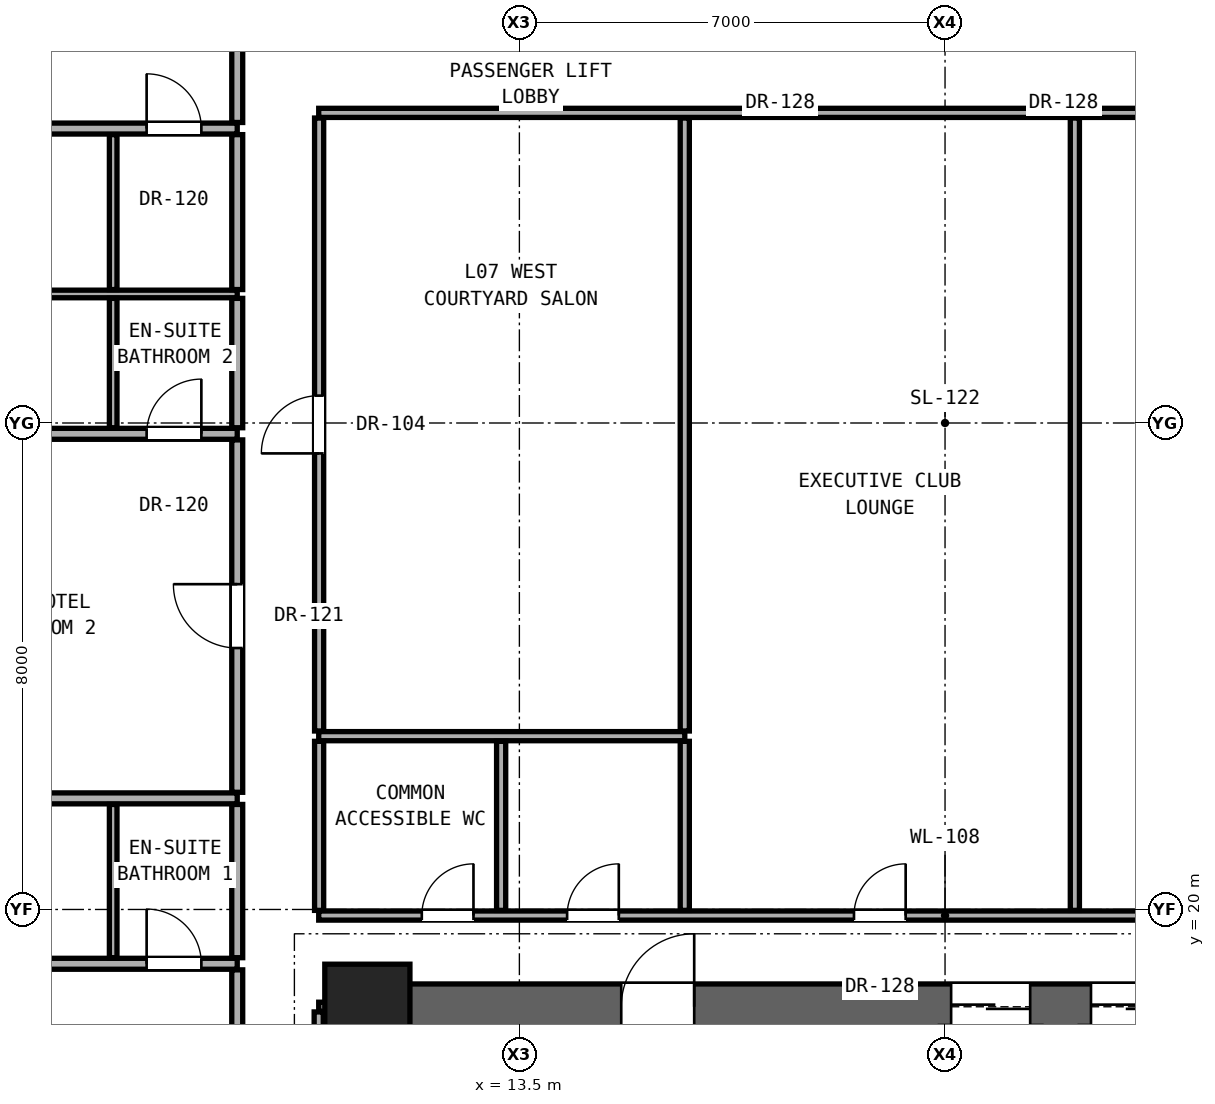
"""IFC4 building model, lengths in metres.
Left out: names, types, materials, properties, quantities, classifications, styles, units other than length and angle.
Written with IfcOpenShell. Run it as: python <this file> out.ifc"""

import sys

from ifc_helpers import new_model, si_unit, direction, frame, frame_2d, origin, origin_2d, place, context, subcontext, project, spatial, rectangle, extrude, element, fill, save


model = new_model("IFC4")
c1 = context("Model", 3, precision=1e-05, world=origin(), true_north=direction((0.0, 1.0)))
c2 = subcontext(c1, "Body", "Model", "MODEL_VIEW")
j1 = project(units=[si_unit("LENGTHUNIT", "METRE"), si_unit("PLANEANGLEUNIT", "RADIAN")], contexts=[c1])
p1 = place(None, origin())
s1 = spatial("IfcSite", under=j1, at=p1, CompositionType="ELEMENT")
p2 = place(p1, origin())
s2 = spatial("IfcBuilding", under=s1, at=p2, CompositionType="ELEMENT")
p3 = place(p2, frame((0.0, 0.0, 29.0)))
s3 = spatial("IfcBuildingStorey", under=s2, at=p3, CompositionType="ELEMENT", Elevation=29.0)
p4 = place(p3, frame((11.0, 18.4, 0.0), z_axis=(0.0, 0.0, 1.0), x_axis=(1.0, 0.0, 0.0)))
e1 = element("IfcColumn", 1, at=p4, inside=s3, PredefinedType="COLUMN", context=c2, shape_type="SweptSolid", body=[
    extrude(rectangle(XDim=1.4, YDim=1.4, at=origin_2d()), origin(), (0.0, 0.0, 1.0), 3.3),
])
p5 = place(p3, frame((11.0, 12.4, 0.0), z_axis=(0.0, 0.0, 1.0), x_axis=(0.0, 1.0, 0.0)))
e2 = element("IfcWall", 2, at=p5, inside=s3, PredefinedType="SHEAR", context=c2, shape_type="SweptSolid", body=[
    extrude(rectangle(XDim=6.0, YDim=0.75, at=frame_2d((3.0, 0.0))), origin(), (0.0, 0.0, 1.0), 3.06),
])
p6 = place(p3, frame((11.0, 18.4, 0.0), z_axis=(0.0, 0.0, 1.0), x_axis=(1.0, 0.0, 0.0)))
e3 = element("IfcWall", 3, at=p6, inside=s3, PredefinedType="SHEAR", context=c2, shape_type="SweptSolid", body=[
    extrude(rectangle(XDim=19.0, YDim=0.75, at=frame_2d((9.5, 0.0))), origin(), (0.0, 0.0, 1.0), 3.06),
])
p7 = place(p6, frame((4.175, 0.0, 0.0)))
e4 = element("IfcOpeningElement", 4, at=p7, cuts=e3, PredefinedType="OPENING", context=c2, shape_type="SweptSolid", body=[
    extrude(rectangle(XDim=1.2, YDim=2.25, at=frame_2d((0.6, 1.125))), frame((0.0, 0.385, 0.0), z_axis=(0.0, -1.0, 0.0), x_axis=(1.0, 0.0, 0.0)), (0.0, 0.0, 1.0), 0.77),
])
p8 = place(p6, frame((9.6, 0.0, 0.0)))
e5 = element("IfcOpeningElement", 5, at=p8, cuts=e3, PredefinedType="OPENING", context=c2, shape_type="SweptSolid", body=[
    extrude(rectangle(XDim=1.3, YDim=2.3, at=frame_2d((0.65, 1.15))), frame((0.0, 0.385, 0.0), z_axis=(0.0, -1.0, 0.0), x_axis=(1.0, 0.0, 0.0)), (0.0, 0.0, 1.0), 0.77),
])
p9 = place(p6, frame((11.9, 0.0, 0.0)))
e6 = element("IfcOpeningElement", 6, at=p9, cuts=e3, PredefinedType="OPENING", context=c2, shape_type="SweptSolid", body=[
    extrude(rectangle(XDim=1.3, YDim=2.3, at=frame_2d((0.65, 1.15))), frame((0.0, 0.385, 0.0), z_axis=(0.0, -1.0, 0.0), x_axis=(1.0, 0.0, 0.0)), (0.0, 0.0, 1.0), 0.77),
])
p10 = place(p6, frame((14.3, 0.0, 0.0)))
e7 = element("IfcOpeningElement", 7, at=p10, cuts=e3, PredefinedType="OPENING", context=c2, shape_type="SweptSolid", body=[
    extrude(rectangle(XDim=1.3, YDim=2.3, at=frame_2d((0.65, 1.15))), frame((0.0, 0.385, 0.0), z_axis=(0.0, -1.0, 0.0), x_axis=(1.0, 0.0, 0.0)), (0.0, 0.0, 1.0), 0.77),
])
p11 = place(p6, frame((16.6, 0.0, 0.0)))
e8 = element("IfcOpeningElement", 8, at=p11, cuts=e3, PredefinedType="OPENING", context=c2, shape_type="SweptSolid", body=[
    extrude(rectangle(XDim=1.3, YDim=2.3, at=frame_2d((0.65, 1.15))), frame((0.0, 0.385, 0.0), z_axis=(0.0, -1.0, 0.0), x_axis=(1.0, 0.0, 0.0)), (0.0, 0.0, 1.0), 0.77),
])
p12 = place(p3, frame((10.2, 18.4, 0.0), z_axis=(0.0, 0.0, 1.0), x_axis=(1.0, 0.0, 0.0)))
e9 = element("IfcWall", 9, at=p12, inside=s3, PredefinedType="PARTITIONING", context=c2, shape_type="SweptSolid", body=[
    extrude(rectangle(XDim=0.43, YDim=0.15, at=frame_2d((0.215, 0.0))), origin(), (0.0, 0.0, 1.0), 2.436),
])
p13 = place(p3, frame((-1.04, 19.107, 0.0), z_axis=(0.0, 0.0, 1.0), x_axis=(1.0, 0.0, 0.0)))
e10 = element("IfcWall", 10, at=p13, inside=s3, PredefinedType="PARTITIONING", context=c2, shape_type="SweptSolid", body=[
    extrude(rectangle(XDim=9.9, YDim=0.18, at=frame_2d((4.95, 0.0))), origin(), (0.0, 0.0, 1.0), 2.125),
])
p14 = place(p13, frame((4.125, 0.0, 0.0)))
e11 = element("IfcOpeningElement", 11, at=p14, cuts=e10, PredefinedType="OPENING", context=c2, shape_type="SweptSolid", body=[
    extrude(rectangle(XDim=0.85, YDim=2.01, at=frame_2d((0.425, 1.005))), frame((0.0, 0.1, 0.0), z_axis=(0.0, -1.0, 0.0), x_axis=(1.0, 0.0, 0.0)), (0.0, 0.0, 1.0), 0.2),
])
p15 = place(p13, frame((8.41, 0.0, 0.0)))
e12 = element("IfcOpeningElement", 12, at=p15, cuts=e10, PredefinedType="OPENING", context=c2, shape_type="SweptSolid", body=[
    extrude(rectangle(XDim=0.9, YDim=2.1, at=frame_2d((0.45, 1.05))), frame((0.0, 0.1, 0.0), z_axis=(0.0, -1.0, 0.0), x_axis=(1.0, 0.0, 0.0)), (0.0, 0.0, 1.0), 0.2),
])
p16 = place(p3, frame((10.2, 19.9, 0.0), z_axis=(0.0, 0.0, 1.0), x_axis=(1.0, 0.0, 0.0)))
e13 = element("IfcWall", 13, at=p16, inside=s3, PredefinedType="PARTITIONING", context=c2, shape_type="SweptSolid", body=[
    extrude(rectangle(XDim=20.6, YDim=0.15, at=frame_2d((10.3, 0.0))), origin(), (0.0, 0.0, 1.0), 2.104),
])
p17 = place(p16, frame((1.695, 0.0, 0.0)))
e14 = element("IfcOpeningElement", 14, at=p17, cuts=e13, PredefinedType="OPENING", context=c2, shape_type="SweptSolid", body=[
    extrude(rectangle(XDim=0.85, YDim=2.01, at=frame_2d((0.425, 1.005))), frame((0.0, 0.085, 0.0), z_axis=(0.0, -1.0, 0.0), x_axis=(1.0, 0.0, 0.0)), (0.0, 0.0, 1.0), 0.17),
])
p18 = place(p16, frame((4.085, 0.0, 0.0)))
e15 = element("IfcOpeningElement", 15, at=p18, cuts=e13, PredefinedType="OPENING", context=c2, shape_type="SweptSolid", body=[
    extrude(rectangle(XDim=0.85, YDim=2.01, at=frame_2d((0.425, 1.005))), frame((0.0, 0.085, 0.0), z_axis=(0.0, -1.0, 0.0), x_axis=(1.0, 0.0, 0.0)), (0.0, 0.0, 1.0), 0.17),
])
p19 = place(p16, frame((8.802, 0.0, 0.0)))
e16 = element("IfcOpeningElement", 16, at=p19, cuts=e13, PredefinedType="OPENING", context=c2, shape_type="SweptSolid", body=[
    extrude(rectangle(XDim=0.85, YDim=2.01, at=frame_2d((0.425, 1.005))), frame((0.0, 0.085, 0.0), z_axis=(0.0, -1.0, 0.0), x_axis=(1.0, 0.0, 0.0)), (0.0, 0.0, 1.0), 0.17),
])
p20 = place(p3, frame((-1.04, 21.827, 0.0), z_axis=(0.0, 0.0, 1.0), x_axis=(1.0, 0.0, 0.0)))
e17 = element("IfcWall", 17, at=p20, inside=s3, PredefinedType="PARTITIONING", context=c2, shape_type="SweptSolid", body=[
    extrude(rectangle(XDim=9.9, YDim=0.18, at=frame_2d((4.95, 0.0))), origin(), (0.0, 0.0, 1.0), 2.125),
])
p21 = place(p3, frame((10.2, 22.85, 0.0), z_axis=(0.0, 0.0, 1.0), x_axis=(1.0, 0.0, 0.0)))
e18 = element("IfcWall", 18, at=p21, inside=s3, PredefinedType="PARTITIONING", context=c2, shape_type="SweptSolid", body=[
    extrude(rectangle(XDim=6.02, YDim=0.15, at=frame_2d((3.01, 0.0))), origin(), (0.0, 0.0, 1.0), 2.104),
])
p22 = place(p3, frame((-1.04, 27.822, 0.0), z_axis=(0.0, 0.0, 1.0), x_axis=(1.0, 0.0, 0.0)))
e19 = element("IfcWall", 19, at=p22, inside=s3, PredefinedType="PARTITIONING", context=c2, shape_type="SweptSolid", body=[
    extrude(rectangle(XDim=9.9, YDim=0.18, at=frame_2d((4.95, 0.0))), origin(), (0.0, 0.0, 1.0), 2.125),
])
p23 = place(p22, frame((3.525, 0.0, 0.0)))
e20 = element("IfcOpeningElement", 20, at=p23, cuts=e19, PredefinedType="OPENING", context=c2, shape_type="SweptSolid", body=[
    extrude(rectangle(XDim=0.85, YDim=2.01, at=frame_2d((0.425, 1.005))), frame((0.0, 0.1, 0.0), z_axis=(0.0, -1.0, 0.0), x_axis=(1.0, 0.0, 0.0)), (0.0, 0.0, 1.0), 0.2),
])
p24 = place(p22, frame((8.41, 0.0, 0.0)))
e21 = element("IfcOpeningElement", 21, at=p24, cuts=e19, PredefinedType="OPENING", context=c2, shape_type="SweptSolid", body=[
    extrude(rectangle(XDim=0.9, YDim=2.1, at=frame_2d((0.45, 1.05))), frame((0.0, 0.1, 0.0), z_axis=(0.0, -1.0, 0.0), x_axis=(1.0, 0.0, 0.0)), (0.0, 0.0, 1.0), 0.2),
])
p25 = place(p3, frame((-1.04, 30.122, 0.0), z_axis=(0.0, 0.0, 1.0), x_axis=(1.0, 0.0, 0.0)))
e22 = element("IfcWall", 22, at=p25, inside=s3, PredefinedType="PARTITIONING", context=c2, shape_type="SweptSolid", body=[
    extrude(rectangle(XDim=9.9, YDim=0.125, at=frame_2d((4.95, 0.0))), origin(), (0.0, 0.0, 1.0), 2.125),
])
p26 = place(p3, frame((-1.04, 32.842, 0.0), z_axis=(0.0, 0.0, 1.0), x_axis=(1.0, 0.0, 0.0)))
e23 = element("IfcWall", 23, at=p26, inside=s3, PredefinedType="PARTITIONING", context=c2, shape_type="SweptSolid", body=[
    extrude(rectangle(XDim=9.9, YDim=0.18, at=frame_2d((4.95, 0.0))), origin(), (0.0, 0.0, 1.0), 2.125),
])
p27 = place(p26, frame((4.125, 0.0, 0.0)))
e24 = element("IfcOpeningElement", 24, at=p27, cuts=e23, PredefinedType="OPENING", context=c2, shape_type="SweptSolid", body=[
    extrude(rectangle(XDim=0.85, YDim=2.01, at=frame_2d((0.425, 1.005))), frame((0.0, 0.1, 0.0), z_axis=(0.0, -1.0, 0.0), x_axis=(1.0, 0.0, 0.0)), (0.0, 0.0, 1.0), 0.2),
])
p28 = place(p26, frame((8.41, 0.0, 0.0)))
e25 = element("IfcOpeningElement", 25, at=p28, cuts=e23, PredefinedType="OPENING", context=c2, shape_type="SweptSolid", body=[
    extrude(rectangle(XDim=0.9, YDim=2.1, at=frame_2d((0.45, 1.05))), frame((0.0, 0.1, 0.0), z_axis=(0.0, -1.0, 0.0), x_axis=(1.0, 0.0, 0.0)), (0.0, 0.0, 1.0), 0.2),
])
p29 = place(p3, frame((10.2, 33.1, 0.0), z_axis=(0.0, 0.0, 1.0), x_axis=(1.0, 0.0, 0.0)))
e26 = element("IfcWall", 26, at=p29, inside=s3, PredefinedType="PARTITIONING", context=c2, shape_type="SweptSolid", body=[
    extrude(rectangle(XDim=20.6, YDim=0.15, at=frame_2d((10.3, 0.0))), origin(), (0.0, 0.0, 1.0), 2.104),
])
p30 = place(p29, frame((16.073, 0.0, 0.0)))
e27 = element("IfcOpeningElement", 27, at=p30, cuts=e26, PredefinedType="OPENING", context=c2, shape_type="SweptSolid", body=[
    extrude(rectangle(XDim=0.85, YDim=2.01, at=frame_2d((0.425, 1.005))), frame((0.0, 0.085, 0.0), z_axis=(0.0, -1.0, 0.0), x_axis=(1.0, 0.0, 0.0)), (0.0, 0.0, 1.0), 0.17),
])
p31 = place(p3, frame((6.82, 19.207, 0.0), z_axis=(0.0, 0.0, 1.0), x_axis=(0.0, 1.0, 0.0)))
e28 = element("IfcWall", 28, at=p31, inside=s3, PredefinedType="PARTITIONING", context=c2, shape_type="SweptSolid", body=[
    extrude(rectangle(XDim=2.52, YDim=0.125, at=frame_2d((1.26, 0.0))), origin(), (0.0, 0.0, 1.0), 3.06),
])
p32 = place(p3, frame((6.82, 27.922, 0.0), z_axis=(0.0, 0.0, 1.0), x_axis=(0.0, 1.0, 0.0)))
e29 = element("IfcWall", 29, at=p32, inside=s3, PredefinedType="PARTITIONING", context=c2, shape_type="SweptSolid", body=[
    extrude(rectangle(XDim=2.127, YDim=0.125, at=frame_2d((1.064, 0.0))), origin(), (0.0, 0.0, 1.0), 3.06),
])
p33 = place(p3, frame((6.82, 30.195, 0.0), z_axis=(0.0, 0.0, 1.0), x_axis=(0.0, 1.0, 0.0)))
e30 = element("IfcWall", 30, at=p33, inside=s3, PredefinedType="PARTITIONING", context=c2, shape_type="SweptSolid", body=[
    extrude(rectangle(XDim=2.547, YDim=0.125, at=frame_2d((1.274, 0.0))), origin(), (0.0, 0.0, 1.0), 2.279),
])
p34 = place(p3, frame((8.86, 14.304, 0.0), z_axis=(0.0, 0.0, 1.0), x_axis=(0.0, 1.0, 0.0)))
e31 = element("IfcWall", 31, at=p34, inside=s3, PredefinedType="PARTITIONING", context=c2, shape_type="SweptSolid", body=[
    extrude(rectangle(XDim=4.703, YDim=0.18, at=frame_2d((2.352, 0.0))), origin(), (0.0, 0.0, 1.0), 2.436),
])
p35 = place(p34, frame((2.427, 0.0, 0.0)))
e32 = element("IfcOpeningElement", 32, at=p35, cuts=e31, PredefinedType="OPENING", context=c2, shape_type="SweptSolid", body=[
    extrude(rectangle(XDim=1.05, YDim=2.2, at=frame_2d((0.525, 1.1))), frame((0.0, 0.1, 0.0), z_axis=(0.0, -1.0, 0.0), x_axis=(1.0, 0.0, 0.0)), (0.0, 0.0, 1.0), 0.2),
])
p36 = place(p3, frame((8.86, 19.207, 0.0), z_axis=(0.0, 0.0, 1.0), x_axis=(0.0, 1.0, 0.0)))
e33 = element("IfcWall", 33, at=p36, inside=s3, PredefinedType="PARTITIONING", context=c2, shape_type="SweptSolid", body=[
    extrude(rectangle(XDim=2.52, YDim=0.18, at=frame_2d((1.26, 0.0))), origin(), (0.0, 0.0, 1.0), 3.06),
])
p37 = place(p3, frame((8.86, 21.927, 0.0), z_axis=(0.0, 0.0, 1.0), x_axis=(0.0, 1.0, 0.0)))
e34 = element("IfcWall", 34, at=p37, inside=s3, PredefinedType="PARTITIONING", context=c2, shape_type="SweptSolid", body=[
    extrude(rectangle(XDim=5.795, YDim=0.18, at=frame_2d((2.897, 0.0))), origin(), (0.0, 0.0, 1.0), 2.279),
])
p38 = place(p37, frame((2.373, 0.0, 0.0)))
e35 = element("IfcOpeningElement", 35, at=p38, cuts=e34, PredefinedType="OPENING", context=c2, shape_type="SweptSolid", body=[
    extrude(rectangle(XDim=1.05, YDim=2.2, at=frame_2d((0.525, 1.1))), frame((0.0, 0.1, 0.0), z_axis=(0.0, -1.0, 0.0), x_axis=(1.0, 0.0, 0.0)), (0.0, 0.0, 1.0), 0.2),
])
p39 = place(p3, frame((8.86, 27.922, 0.0), z_axis=(0.0, 0.0, 1.0), x_axis=(0.0, 1.0, 0.0)))
e36 = element("IfcWall", 36, at=p39, inside=s3, PredefinedType="PARTITIONING", context=c2, shape_type="SweptSolid", body=[
    extrude(rectangle(XDim=2.127, YDim=0.18, at=frame_2d((1.064, 0.0))), origin(), (0.0, 0.0, 1.0), 3.06),
])
p40 = place(p3, frame((8.86, 30.195, 0.0), z_axis=(0.0, 0.0, 1.0), x_axis=(0.0, 1.0, 0.0)))
e37 = element("IfcWall", 37, at=p40, inside=s3, PredefinedType="PARTITIONING", context=c2, shape_type="SweptSolid", body=[
    extrude(rectangle(XDim=2.547, YDim=0.18, at=frame_2d((1.274, 0.0))), origin(), (0.0, 0.0, 1.0), 2.279),
])
p41 = place(p3, frame((8.86, 32.942, 0.0), z_axis=(0.0, 0.0, 1.0), x_axis=(0.0, 1.0, 0.0)))
e38 = element("IfcWall", 38, at=p41, inside=s3, PredefinedType="PARTITIONING", context=c2, shape_type="SweptSolid", body=[
    extrude(rectangle(XDim=8.754, YDim=0.18, at=frame_2d((4.377, 0.0))), origin(), (0.0, 0.0, 1.0), 2.436),
])
p42 = place(p41, frame((3.852, 0.0, 0.0)))
e39 = element("IfcOpeningElement", 39, at=p42, cuts=e38, PredefinedType="OPENING", context=c2, shape_type="SweptSolid", body=[
    extrude(rectangle(XDim=1.05, YDim=2.2, at=frame_2d((0.525, 1.1))), frame((0.0, 0.1, 0.0), z_axis=(0.0, -1.0, 0.0), x_axis=(1.0, 0.0, 0.0)), (0.0, 0.0, 1.0), 0.2),
])
p43 = place(p3, frame((10.2, 12.335, 0.0), z_axis=(0.0, 0.0, 1.0), x_axis=(0.0, 1.0, 0.0)))
e40 = element("IfcWall", 40, at=p43, inside=s3, PredefinedType="PARTITIONING", context=c2, shape_type="SweptSolid", body=[
    extrude(rectangle(XDim=5.98, YDim=0.15, at=frame_2d((2.99, 0.0))), origin(), (0.0, 0.0, 1.0), 2.436),
])
p44 = place(p3, frame((10.207, 19.985, 0.0), z_axis=(0.0, 0.0, 1.0), x_axis=(0.0, 1.0, 0.0)))
e41 = element("IfcWall", 41, at=p44, inside=s3, PredefinedType="PARTITIONING", context=c2, shape_type="SweptSolid", body=[
    extrude(rectangle(XDim=2.78, YDim=0.15, at=frame_2d((1.39, 0.0))), origin(), (0.0, 0.0, 1.0), 3.06),
])
p45 = place(p3, frame((10.207, 22.935, 0.0), z_axis=(0.0, 0.0, 1.0), x_axis=(0.0, 1.0, 0.0)))
e42 = element("IfcWall", 42, at=p45, inside=s3, PredefinedType="PARTITIONING", context=c2, shape_type="SweptSolid", body=[
    extrude(rectangle(XDim=10.08, YDim=0.15, at=frame_2d((5.04, 0.0))), origin(), (0.0, 0.0, 1.0), 2.279),
])
p46 = place(p45, frame((4.565, 0.0, 0.0)))
e43 = element("IfcOpeningElement", 43, at=p46, cuts=e42, PredefinedType="OPENING", context=c2, shape_type="SweptSolid", body=[
    extrude(rectangle(XDim=0.95, YDim=2.15, at=frame_2d((0.475, 1.075))), frame((0.0, 0.085, 0.0), z_axis=(0.0, -1.0, 0.0), x_axis=(1.0, 0.0, 0.0)), (0.0, 0.0, 1.0), 0.17),
])
for number, where, z_axis, x_axis in (
    (44, (13.2, 19.985, 0.0), (0.0, 0.0, 1.0), (0.0, 1.0, 0.0)),
    (45, (16.22, 19.985, 0.0), (0.0, 0.0, 1.0), (0.0, 1.0, 0.0)),
):
    element("IfcWall", number, at=place(p3, frame(where, z_axis=z_axis, x_axis=x_axis)), inside=s3, PredefinedType="PARTITIONING", context=c2, shape_type="SweptSolid", body=[
        extrude(rectangle(XDim=2.78, YDim=0.15, at=frame_2d((1.39, 0.0))), origin(), (0.0, 0.0, 1.0), 3.06),
    ])
p47 = place(p3, frame((16.22, 22.935, 0.0), z_axis=(0.0, 0.0, 1.0), x_axis=(0.0, 1.0, 0.0)))
e46 = element("IfcWall", 46, at=p47, inside=s3, PredefinedType="PARTITIONING", context=c2, shape_type="SweptSolid", body=[
    extrude(rectangle(XDim=10.08, YDim=0.15, at=frame_2d((5.04, 0.0))), origin(), (0.0, 0.0, 1.0), 2.104),
])
p48 = place(p3, frame((22.635, 19.985, 0.0), z_axis=(0.0, 0.0, 1.0), x_axis=(0.0, 1.0, 0.0)))
e47 = element("IfcWall", 47, at=p48, inside=s3, PredefinedType="PARTITIONING", context=c2, shape_type="SweptSolid", body=[
    extrude(rectangle(XDim=13.03, YDim=0.15, at=frame_2d((6.515, 0.0))), origin(), (0.0, 0.0, 1.0), 2.104),
])
p49 = place(p7, origin())
e48 = element("IfcDoor", 48, at=p49, inside=s3, OperationType="SINGLE_SWING_RIGHT", PredefinedType="DOOR", context=c2, shape_type="SweptSolid", body=[
    extrude(rectangle(XDim=1.2, YDim=2.25, at=frame_2d((0.6, 1.125))), frame((0.0, 0.025, 0.0), z_axis=(0.0, -1.0, 0.0), x_axis=(1.0, 0.0, 0.0)), (0.0, 0.0, 1.0), 0.05),
])
fill(e4, e48)
p50 = place(p17, origin())
e49 = element("IfcDoor", 49, at=p50, inside=s3, OperationType="SINGLE_SWING_RIGHT", PredefinedType="DOOR", context=c2, shape_type="SweptSolid", body=[
    extrude(rectangle(XDim=0.85, YDim=2.01, at=frame_2d((0.425, 1.005))), frame((0.0, 0.025, 0.0), z_axis=(0.0, -1.0, 0.0), x_axis=(1.0, 0.0, 0.0)), (0.0, 0.0, 1.0), 0.05),
])
fill(e14, e49)
p51 = place(p15, origin())
e50 = element("IfcDoor", 50, at=p51, inside=s3, OperationType="SINGLE_SWING_LEFT", PredefinedType="DOOR", context=c2, shape_type="SweptSolid", body=[
    extrude(rectangle(XDim=0.9, YDim=2.1, at=frame_2d((0.45, 1.05))), frame((0.0, 0.025, 0.0), z_axis=(0.0, -1.0, 0.0), x_axis=(1.0, 0.0, 0.0)), (0.0, 0.0, 1.0), 0.05),
])
fill(e12, e50)
p52 = place(p38, origin())
e51 = element("IfcDoor", 51, at=p52, inside=s3, OperationType="SINGLE_SWING_RIGHT", PredefinedType="DOOR", context=c2, shape_type="SweptSolid", body=[
    extrude(rectangle(XDim=1.05, YDim=2.2, at=frame_2d((0.525, 1.1))), frame((0.0, 0.025, 0.0), z_axis=(0.0, -1.0, 0.0), x_axis=(1.0, 0.0, 0.0)), (0.0, 0.0, 1.0), 0.05),
])
fill(e35, e51)
p53 = place(p24, origin())
e52 = element("IfcDoor", 52, at=p53, inside=s3, OperationType="SINGLE_SWING_RIGHT", PredefinedType="DOOR", context=c2, shape_type="SweptSolid", body=[
    extrude(rectangle(XDim=0.9, YDim=2.1, at=frame_2d((0.45, 1.05))), frame((0.0, 0.025, 0.0), z_axis=(0.0, -1.0, 0.0), x_axis=(1.0, 0.0, 0.0)), (0.0, 0.0, 1.0), 0.05),
])
fill(e21, e52)
p54 = place(p28, origin())
e53 = element("IfcDoor", 53, at=p54, inside=s3, OperationType="SINGLE_SWING_LEFT", PredefinedType="DOOR", context=c2, shape_type="SweptSolid", body=[
    extrude(rectangle(XDim=0.9, YDim=2.1, at=frame_2d((0.45, 1.05))), frame((0.0, 0.025, 0.0), z_axis=(0.0, -1.0, 0.0), x_axis=(1.0, 0.0, 0.0)), (0.0, 0.0, 1.0), 0.05),
])
fill(e25, e53)
p55 = place(p18, origin())
e54 = element("IfcDoor", 54, at=p55, inside=s3, OperationType="SINGLE_SWING_RIGHT", PredefinedType="DOOR", context=c2, shape_type="SweptSolid", body=[
    extrude(rectangle(XDim=0.85, YDim=2.01, at=frame_2d((0.425, 1.005))), frame((0.0, 0.025, 0.0), z_axis=(0.0, -1.0, 0.0), x_axis=(1.0, 0.0, 0.0)), (0.0, 0.0, 1.0), 0.05),
])
fill(e15, e54)
p56 = place(p46, origin())
e55 = element("IfcDoor", 55, at=p56, inside=s3, OperationType="SINGLE_SWING_LEFT", PredefinedType="DOOR", context=c2, shape_type="SweptSolid", body=[
    extrude(rectangle(XDim=0.95, YDim=2.15, at=frame_2d((0.475, 1.075))), frame((0.0, 0.025, 0.0), z_axis=(0.0, -1.0, 0.0), x_axis=(1.0, 0.0, 0.0)), (0.0, 0.0, 1.0), 0.05),
])
fill(e43, e55)
p57 = place(p19, origin())
e56 = element("IfcDoor", 56, at=p57, inside=s3, OperationType="SINGLE_SWING_RIGHT", PredefinedType="DOOR", context=c2, shape_type="SweptSolid", body=[
    extrude(rectangle(XDim=0.85, YDim=2.01, at=frame_2d((0.425, 1.005))), frame((0.0, 0.025, 0.0), z_axis=(0.0, -1.0, 0.0), x_axis=(1.0, 0.0, 0.0)), (0.0, 0.0, 1.0), 0.05),
])
fill(e16, e56)
p58 = place(p8, origin())
e57 = element("IfcDoor", 57, at=p58, inside=s3, OperationType="DOUBLE_DOOR_SLIDING", PredefinedType="DOOR", context=c2, shape_type="SweptSolid", body=[
    extrude(rectangle(XDim=1.3, YDim=2.3, at=frame_2d((0.65, 1.15))), frame((0.0, 0.025, 0.0), z_axis=(0.0, -1.0, 0.0), x_axis=(1.0, 0.0, 0.0)), (0.0, 0.0, 1.0), 0.05),
])
fill(e5, e57)
p59 = place(p9, origin())
e58 = element("IfcDoor", 58, at=p59, inside=s3, OperationType="DOUBLE_DOOR_SLIDING", PredefinedType="DOOR", context=c2, shape_type="SweptSolid", body=[
    extrude(rectangle(XDim=1.3, YDim=2.3, at=frame_2d((0.65, 1.15))), frame((0.0, 0.025, 0.0), z_axis=(0.0, -1.0, 0.0), x_axis=(1.0, 0.0, 0.0)), (0.0, 0.0, 1.0), 0.05),
])
fill(e6, e58)
save(model, sys.argv[1])
